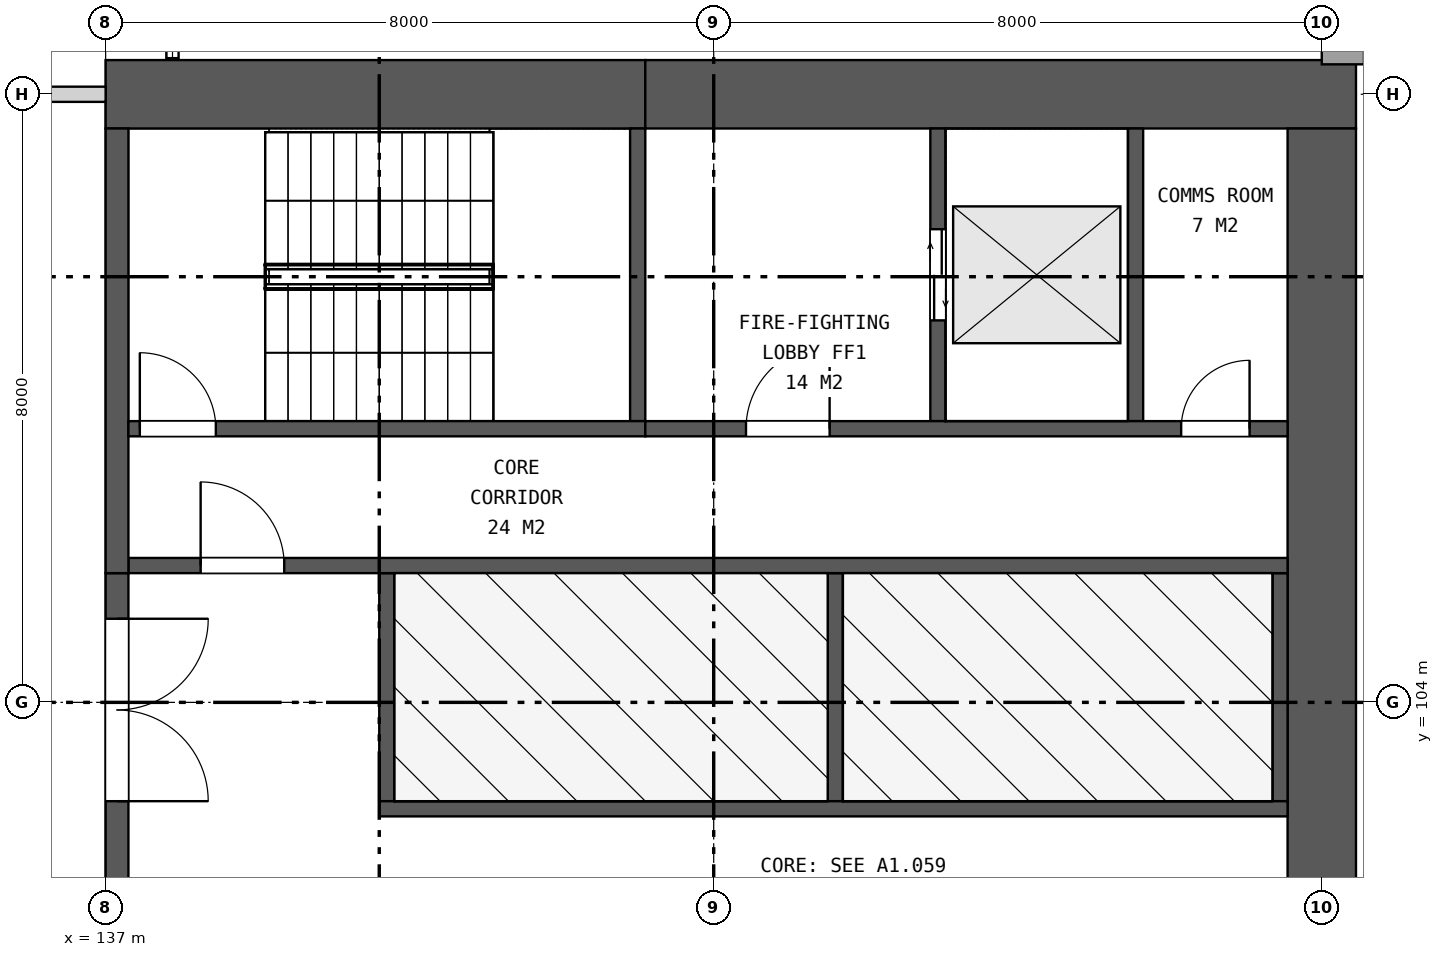
"""IFC4 building model, lengths in metres.
Left out: names, types, materials, properties, quantities, classifications, styles, units other than length and angle.
Written with IfcOpenShell. Run it as: python <this file> out.ifc"""

import sys

from ifc_helpers import new_model, si_unit, direction, frame, frame_2d, origin, place, context, subcontext, project, spatial, rectangle, extrude, element, fill, save


model = new_model("IFC4")
c1 = context("Model", 3, precision=1e-05, world=origin(), true_north=direction((0.0, 1.0)))
c2 = subcontext(c1, "Body", "Model", "MODEL_VIEW")
j1 = project(units=[si_unit("LENGTHUNIT", "METRE"), si_unit("PLANEANGLEUNIT", "RADIAN")], contexts=[c1])
p1 = place(None, origin())
s1 = spatial("IfcSite", under=j1, at=p1, CompositionType="ELEMENT")
p2 = place(p1, origin())
s2 = spatial("IfcBuilding", under=s1, at=p2, CompositionType="ELEMENT")
p3 = place(p2, frame((0.0, 0.0, 10.0)))
s3 = spatial("IfcBuildingStorey", under=s2, at=p3, CompositionType="ELEMENT", Elevation=10.0)
p4 = place(p3, frame((137.0, 112.0, 0.0), z_axis=(0.0, 0.0, 1.0), x_axis=(1.0, 0.0, 0.0)))
e1 = element("IfcWall", 1, at=p4, inside=s3, PredefinedType="SHEAR", context=c2, shape_type="SweptSolid", body=[
    extrude(rectangle(XDim=7.1, YDim=0.9, at=frame_2d((3.55, 0.0))), origin(), (0.0, 0.0, 1.0), 7.5),
])
p5 = place(p3, frame((144.1, 112.0, 0.0), z_axis=(0.0, 0.0, 1.0), x_axis=(1.0, 0.0, 0.0)))
e2 = element("IfcWall", 2, at=p5, inside=s3, PredefinedType="SHEAR", context=c2, shape_type="SweptSolid", body=[
    extrude(rectangle(XDim=9.35, YDim=0.9, at=frame_2d((4.675, 0.0))), origin(), (0.0, 0.0, 1.0), 7.5),
])
p6 = place(p3, frame((153.0, 88.45, 0.0), z_axis=(0.0, 0.0, 1.0), x_axis=(0.0, 1.0, 0.0)))
e3 = element("IfcWall", 3, at=p6, inside=s3, PredefinedType="SHEAR", context=c2, shape_type="SweptSolid", body=[
    extrude(rectangle(XDim=23.1, YDim=0.9, at=frame_2d((11.55, 0.0))), origin(), (0.0, 0.0, 1.0), 7.5),
])
p7 = place(p6, frame((10.35, 0.0, 0.0)))
e4 = element("IfcOpeningElement", 4, at=p7, cuts=e3, PredefinedType="OPENING", context=c2, shape_type="SweptSolid", body=[
    extrude(rectangle(XDim=2.4, YDim=2.4, at=frame_2d((1.2, 1.2))), frame((0.0, 0.46, 0.0), z_axis=(0.0, -1.0, 0.0), x_axis=(1.0, 0.0, 0.0)), (0.0, 0.0, 1.0), 0.92),
])
p8 = place(p3, frame((137.15, 94.3, 0.0), z_axis=(0.0, 0.0, 1.0), x_axis=(0.0, 1.0, 0.0)))
e5 = element("IfcWall", 5, at=p8, inside=s3, PredefinedType="SHEAR", context=c2, shape_type="SweptSolid", body=[
    extrude(rectangle(XDim=11.4, YDim=0.3, at=frame_2d((5.7, 0.0))), origin(), (0.0, 0.0, 1.0), 7.5),
])
p9 = place(p8, frame((0.6, 0.0, 0.0)))
e6 = element("IfcOpeningElement", 6, at=p9, cuts=e5, PredefinedType="OPENING", context=c2, shape_type="SweptSolid", body=[
    extrude(rectangle(XDim=2.4, YDim=2.4, at=frame_2d((1.2, 1.2))), frame((0.0, 0.16, 0.0), z_axis=(0.0, -1.0, 0.0), x_axis=(1.0, 0.0, 0.0)), (0.0, 0.0, 1.0), 0.32),
])
p10 = place(p8, frame((4.5, 0.0, 0.0)))
e7 = element("IfcOpeningElement", 7, at=p10, cuts=e5, PredefinedType="OPENING", context=c2, shape_type="SweptSolid", body=[
    extrude(rectangle(XDim=2.4, YDim=2.4, at=frame_2d((1.2, 1.2))), frame((0.0, 0.16, 0.0), z_axis=(0.0, -1.0, 0.0), x_axis=(1.0, 0.0, 0.0)), (0.0, 0.0, 1.0), 0.32),
])
p11 = place(p8, frame((8.4, 0.0, 0.0)))
e8 = element("IfcOpeningElement", 8, at=p11, cuts=e5, PredefinedType="OPENING", context=c2, shape_type="SweptSolid", body=[
    extrude(rectangle(XDim=2.4, YDim=2.4, at=frame_2d((1.2, 1.2))), frame((0.0, 0.16, 0.0), z_axis=(0.0, -1.0, 0.0), x_axis=(1.0, 0.0, 0.0)), (0.0, 0.0, 1.0), 0.32),
])
for number, where, z_axis, x_axis in (
    (9, (140.7, 102.7, 0.0), (0.0, 0.0, 1.0), (0.0, 1.0, 0.0)),
    (10, (146.6, 102.7, 0.0), (0.0, 0.0, 1.0), (0.0, 1.0, 0.0)),
    (11, (152.45, 102.7, 0.0), (0.0, 0.0, 1.0), (0.0, 1.0, 0.0)),
):
    element("IfcWall", number, at=place(p3, frame(where, z_axis=z_axis, x_axis=x_axis)), inside=s3, PredefinedType="SHEAR", context=c2, shape_type="SweptSolid", body=[
        extrude(rectangle(XDim=3.0, YDim=0.2, at=frame_2d((1.5, 0.0))), origin(), (0.0, 0.0, 1.0), 7.5),
    ])
p12 = place(p3, frame((140.6, 102.6, 0.0), z_axis=(0.0, 0.0, 1.0), x_axis=(1.0, 0.0, 0.0)))
e12 = element("IfcWall", 12, at=p12, inside=s3, PredefinedType="SHEAR", context=c2, shape_type="SweptSolid", body=[
    extrude(rectangle(XDim=11.95, YDim=0.2, at=frame_2d((5.975, 0.0))), origin(), (0.0, 0.0, 1.0), 7.5),
])
p13 = place(p3, frame((137.3, 105.8, 0.0), z_axis=(0.0, 0.0, 1.0), x_axis=(1.0, 0.0, 0.0)))
e13 = element("IfcWall", 13, at=p13, inside=s3, PredefinedType="SHEAR", context=c2, shape_type="SweptSolid", body=[
    extrude(rectangle(XDim=15.25, YDim=0.2, at=frame_2d((7.625, 0.0))), origin(), (0.0, 0.0, 1.0), 7.5),
])
p14 = place(p13, frame((0.95, 0.0, 0.0)))
e14 = element("IfcOpeningElement", 14, at=p14, cuts=e13, PredefinedType="OPENING", context=c2, shape_type="SweptSolid", body=[
    extrude(rectangle(XDim=1.1, YDim=2.1, at=frame_2d((0.55, 1.05))), frame((0.0, 0.11, 0.0), z_axis=(0.0, -1.0, 0.0), x_axis=(1.0, 0.0, 0.0)), (0.0, 0.0, 1.0), 0.22),
])
p15 = place(p3, frame((137.15, 105.7, 0.0), z_axis=(0.0, 0.0, 1.0), x_axis=(0.0, 1.0, 0.0)))
e15 = element("IfcWall", 15, at=p15, inside=s3, PredefinedType="SHEAR", context=c2, shape_type="SweptSolid", body=[
    extrude(rectangle(XDim=5.85, YDim=0.3, at=frame_2d((2.925, 0.0))), origin(), (0.0, 0.0, 1.0), 7.5),
])
p16 = place(p3, frame((144.0, 107.7, 0.0), z_axis=(0.0, 0.0, 1.0), x_axis=(0.0, 1.0, 0.0)))
e16 = element("IfcWall", 16, at=p16, inside=s3, PredefinedType="SHEAR", context=c2, shape_type="SweptSolid", body=[
    extrude(rectangle(XDim=3.85, YDim=0.2, at=frame_2d((1.925, 0.0))), origin(), (0.0, 0.0, 1.0), 7.5),
])
p17 = place(p3, frame((147.95, 107.7, 0.0), z_axis=(0.0, 0.0, 1.0), x_axis=(0.0, 1.0, 0.0)))
e17 = element("IfcWall", 17, at=p17, inside=s3, PredefinedType="SHEAR", context=c2, shape_type="SweptSolid", body=[
    extrude(rectangle(XDim=3.85, YDim=0.2, at=frame_2d((1.925, 0.0))), origin(), (0.0, 0.0, 1.0), 7.5),
])
p18 = place(p17, frame((1.325, 0.0, 0.0)))
e18 = element("IfcOpeningElement", 18, at=p18, cuts=e17, PredefinedType="OPENING", context=c2, shape_type="SweptSolid", body=[
    extrude(rectangle(XDim=1.2, YDim=2.1, at=frame_2d((0.6, 1.05))), frame((0.0, 0.11, 0.0), z_axis=(0.0, -1.0, 0.0), x_axis=(1.0, 0.0, 0.0)), (0.0, 0.0, 1.0), 0.22),
])
p19 = place(p3, frame((150.55, 107.7, 0.0), z_axis=(0.0, 0.0, 1.0), x_axis=(0.0, 1.0, 0.0)))
e19 = element("IfcWall", 19, at=p19, inside=s3, PredefinedType="SHEAR", context=c2, shape_type="SweptSolid", body=[
    extrude(rectangle(XDim=3.85, YDim=0.2, at=frame_2d((1.925, 0.0))), origin(), (0.0, 0.0, 1.0), 7.5),
])
p20 = place(p3, frame((137.3, 107.6, 0.0), z_axis=(0.0, 0.0, 1.0), x_axis=(1.0, 0.0, 0.0)))
e20 = element("IfcWall", 20, at=p20, inside=s3, PredefinedType="SHEAR", context=c2, shape_type="SweptSolid", body=[
    extrude(rectangle(XDim=6.8, YDim=0.2, at=frame_2d((3.4, 0.0))), origin(), (0.0, 0.0, 1.0), 7.5),
])
p21 = place(p20, frame((0.15, 0.0, 0.0)))
e21 = element("IfcOpeningElement", 21, at=p21, cuts=e20, PredefinedType="OPENING", context=c2, shape_type="SweptSolid", body=[
    extrude(rectangle(XDim=1.0, YDim=2.1, at=frame_2d((0.5, 1.05))), frame((0.0, 0.11, 0.0), z_axis=(0.0, -1.0, 0.0), x_axis=(1.0, 0.0, 0.0)), (0.0, 0.0, 1.0), 0.22),
])
p22 = place(p3, frame((144.1, 107.6, 0.0), z_axis=(0.0, 0.0, 1.0), x_axis=(1.0, 0.0, 0.0)))
e22 = element("IfcWall", 22, at=p22, inside=s3, PredefinedType="SHEAR", context=c2, shape_type="SweptSolid", body=[
    extrude(rectangle(XDim=8.45, YDim=0.2, at=frame_2d((4.225, 0.0))), origin(), (0.0, 0.0, 1.0), 7.5),
])
p23 = place(p22, frame((1.325, 0.0, 0.0)))
e23 = element("IfcOpeningElement", 23, at=p23, cuts=e22, PredefinedType="OPENING", context=c2, shape_type="SweptSolid", body=[
    extrude(rectangle(XDim=1.1, YDim=2.1, at=frame_2d((0.55, 1.05))), frame((0.0, 0.11, 0.0), z_axis=(0.0, -1.0, 0.0), x_axis=(1.0, 0.0, 0.0)), (0.0, 0.0, 1.0), 0.22),
])
p24 = place(p22, frame((7.05, 0.0, 0.0)))
e24 = element("IfcOpeningElement", 24, at=p24, cuts=e22, PredefinedType="OPENING", context=c2, shape_type="SweptSolid", body=[
    extrude(rectangle(XDim=0.9, YDim=2.1, at=frame_2d((0.45, 1.05))), frame((0.0, 0.11, 0.0), z_axis=(0.0, -1.0, 0.0), x_axis=(1.0, 0.0, 0.0)), (0.0, 0.0, 1.0), 0.22),
])
p25 = place(p3, frame((153.0, 112.597, 0.0), z_axis=(0.0, 0.0, 1.0), x_axis=(1.0, 0.0, 0.0)))
e25 = element("IfcWall", 25, at=p25, inside=s3, PredefinedType="SOLIDWALL", context=c2, shape_type="SweptSolid", body=[
    extrude(rectangle(XDim=0.555, YDim=0.406, at=frame_2d((0.277, 0.0))), origin(), (0.0, 0.0, 1.0), 7.1),
])
p26 = place(p3, frame((129.6, 112.0, 0.0), z_axis=(0.0, 0.0, 1.0), x_axis=(1.0, 0.0, 0.0)))
e26 = element("IfcWall", 26, at=p26, inside=s3, PredefinedType="PARTITIONING", context=c2, shape_type="SweptSolid", body=[
    extrude(rectangle(XDim=7.4, YDim=0.2, at=frame_2d((3.7, 0.0))), origin(), (0.0, 0.0, 1.0), 6.551),
])
p27 = place(p26, frame((2.2, 0.0, 0.0)))
e27 = element("IfcOpeningElement", 27, at=p27, cuts=e26, PredefinedType="OPENING", context=c2, shape_type="SweptSolid", body=[
    extrude(rectangle(XDim=2.4, YDim=2.4, at=frame_2d((1.2, 1.2))), frame((0.0, 0.11, 0.0), z_axis=(0.0, -1.0, 0.0), x_axis=(1.0, 0.0, 0.0)), (0.0, 0.0, 1.0), 0.22),
])
p28 = place(p11, frame((2.4, 0.0, 0.0), z_axis=(0.0, 0.0, 1.0), x_axis=(-1.0, 0.0, 0.0)))
e28 = element("IfcDoor", 28, at=p28, inside=s3, OperationType="DOUBLE_DOOR_SINGLE_SWING", PredefinedType="DOOR", context=c2, shape_type="SweptSolid", body=[
    extrude(rectangle(XDim=2.4, YDim=2.4, at=frame_2d((1.2, 1.2))), frame((0.0, 0.025, 0.0), z_axis=(0.0, -1.0, 0.0), x_axis=(1.0, 0.0, 0.0)), (0.0, 0.0, 1.0), 0.05),
])
fill(e8, e28)
p29 = place(p14, origin())
e29 = element("IfcDoor", 29, at=p29, inside=s3, OperationType="SINGLE_SWING_LEFT", PredefinedType="DOOR", context=c2, shape_type="SweptSolid", body=[
    extrude(rectangle(XDim=1.1, YDim=2.1, at=frame_2d((0.55, 1.05))), frame((0.0, 0.025, 0.0), z_axis=(0.0, -1.0, 0.0), x_axis=(1.0, 0.0, 0.0)), (0.0, 0.0, 1.0), 0.05),
])
fill(e14, e29)
p30 = place(p18, origin())
e30 = element("IfcDoor", 30, at=p30, inside=s3, OperationType="DOUBLE_DOOR_SLIDING", PredefinedType="DOOR", context=c2, shape_type="SweptSolid", body=[
    extrude(rectangle(XDim=1.2, YDim=2.1, at=frame_2d((0.6, 1.05))), frame((0.0, 0.025, 0.0), z_axis=(0.0, -1.0, 0.0), x_axis=(1.0, 0.0, 0.0)), (0.0, 0.0, 1.0), 0.05),
])
fill(e18, e30)
p31 = place(p21, origin())
e31 = element("IfcDoor", 31, at=p31, inside=s3, OperationType="SINGLE_SWING_LEFT", PredefinedType="DOOR", context=c2, shape_type="SweptSolid", body=[
    extrude(rectangle(XDim=1.0, YDim=2.1, at=frame_2d((0.5, 1.05))), frame((0.0, 0.025, 0.0), z_axis=(0.0, -1.0, 0.0), x_axis=(1.0, 0.0, 0.0)), (0.0, 0.0, 1.0), 0.05),
])
fill(e21, e31)
p32 = place(p23, origin())
e32 = element("IfcDoor", 32, at=p32, inside=s3, OperationType="SINGLE_SWING_RIGHT", PredefinedType="DOOR", context=c2, shape_type="SweptSolid", body=[
    extrude(rectangle(XDim=1.1, YDim=2.1, at=frame_2d((0.55, 1.05))), frame((0.0, 0.025, 0.0), z_axis=(0.0, -1.0, 0.0), x_axis=(1.0, 0.0, 0.0)), (0.0, 0.0, 1.0), 0.05),
])
fill(e23, e32)
p33 = place(p24, origin())
e33 = element("IfcDoor", 33, at=p33, inside=s3, OperationType="SINGLE_SWING_RIGHT", PredefinedType="DOOR", context=c2, shape_type="SweptSolid", body=[
    extrude(rectangle(XDim=0.9, YDim=2.1, at=frame_2d((0.45, 1.05))), frame((0.0, 0.025, 0.0), z_axis=(0.0, -1.0, 0.0), x_axis=(1.0, 0.0, 0.0)), (0.0, 0.0, 1.0), 0.05),
])
fill(e24, e33)
save(model, sys.argv[1])
